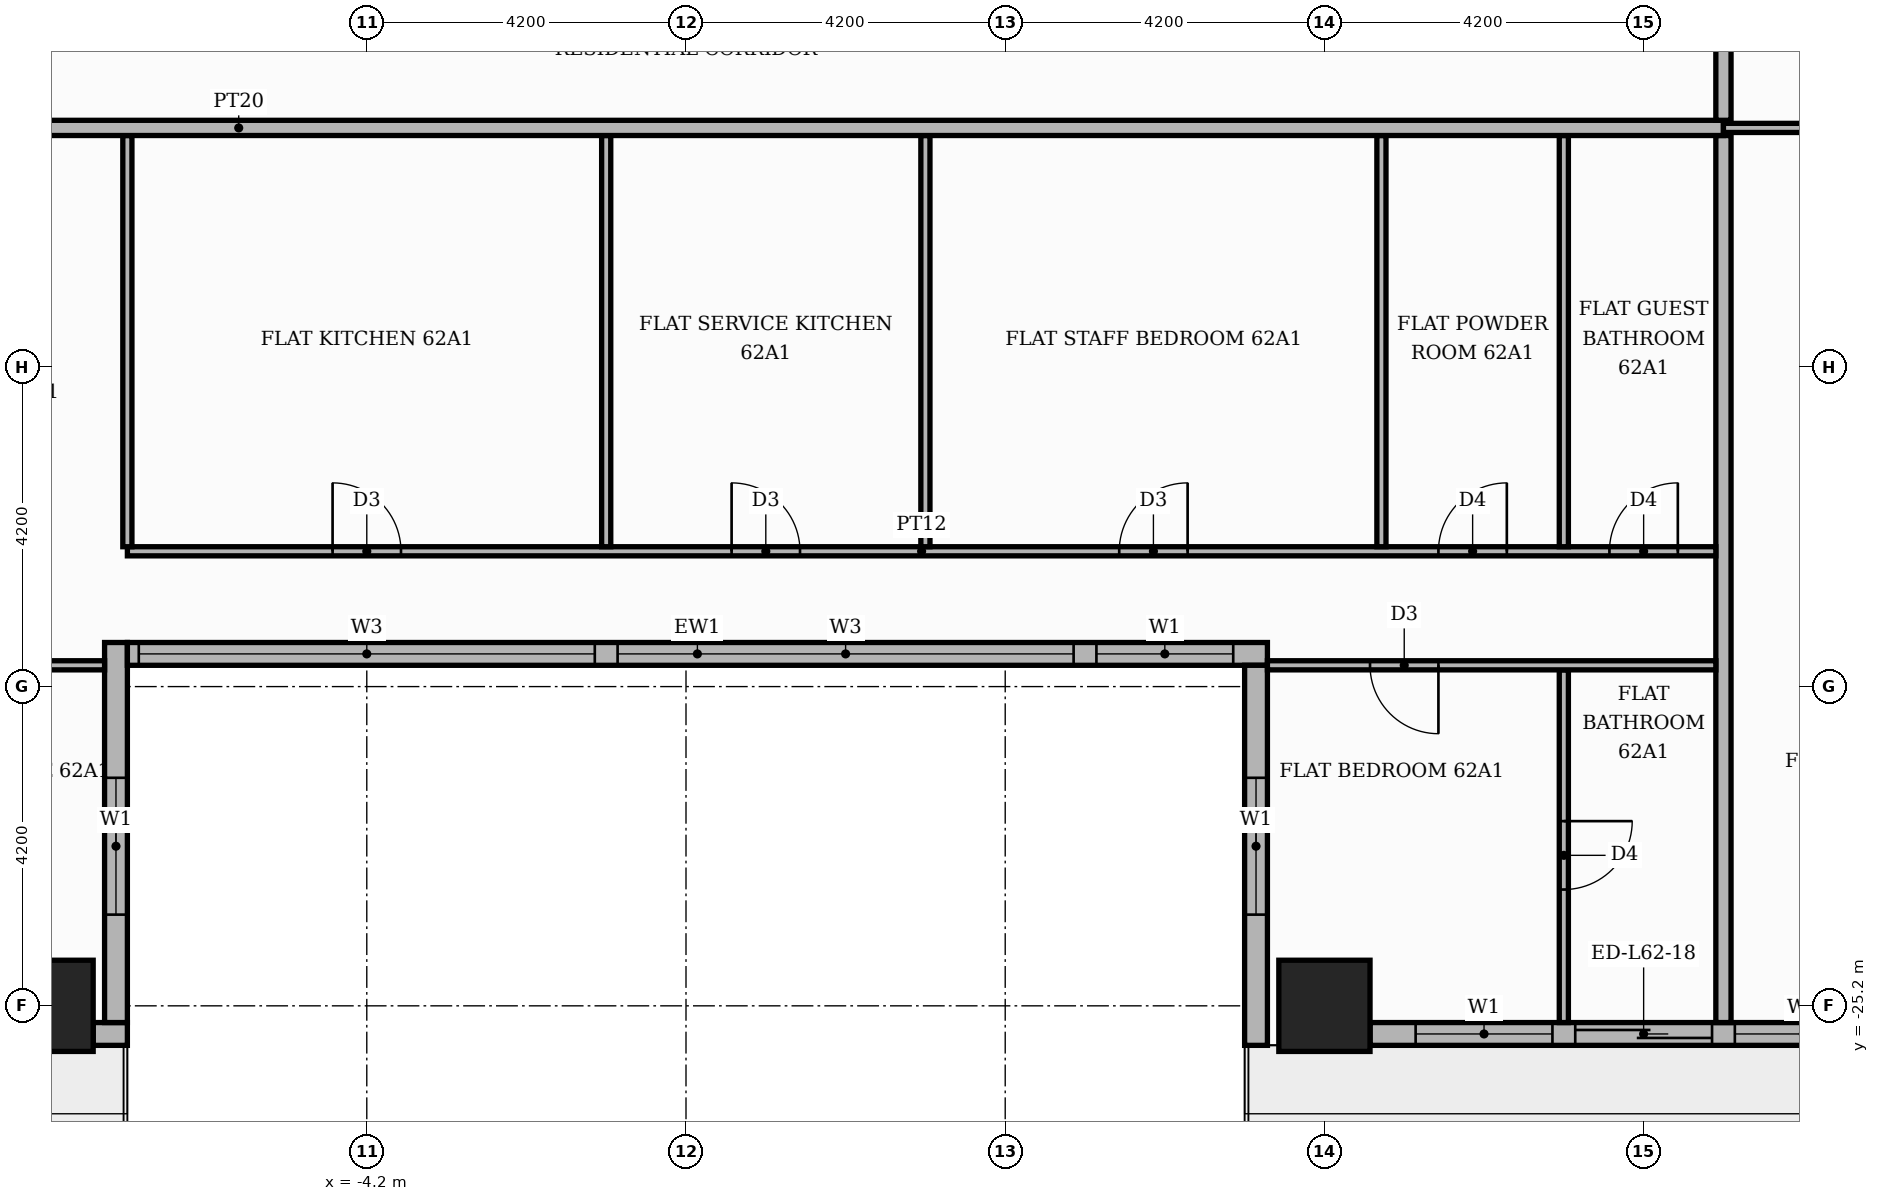
"""IFC4 building model, lengths in metres.
Left out: names, types, materials, properties, quantities, classifications, styles, units other than length and angle.
Written with IfcOpenShell. Run it as: python <this file> out.ifc"""

import sys

from ifc_helpers import new_model, si_unit, direction, frame, frame_2d, origin, origin_2d, place, context, subcontext, project, spatial, rectangle, extrude, element, fill, save


model = new_model("IFC4")
c1 = context("Model", 3, precision=1e-05, world=origin(), true_north=direction((0.0, 1.0)))
c2 = subcontext(c1, "Body", "Model", "MODEL_VIEW")
j1 = project(units=[si_unit("LENGTHUNIT", "METRE"), si_unit("PLANEANGLEUNIT", "RADIAN")], contexts=[c1])
p1 = place(None, origin())
s1 = spatial("IfcSite", under=j1, at=p1, CompositionType="ELEMENT")
p2 = place(p1, origin())
s2 = spatial("IfcBuilding", under=s1, at=p2, CompositionType="ELEMENT")
p3 = place(p2, frame((0.0, 0.0, 260.1)))
s3 = spatial("IfcBuildingStorey", under=s2, at=p3, CompositionType="ELEMENT", Elevation=260.1)
for number, where, z_axis, x_axis in (
    (1, (8.4, -25.2, 0.0), (0.0, 0.0, 1.0), (1.0, 0.0, 0.0)),
    (2, (-8.4, -25.2, 0.0), (0.0, 0.0, 1.0), (1.0, 0.0, 0.0)),
):
    element("IfcColumn", number, at=place(p3, frame(where, z_axis=z_axis, x_axis=x_axis)), inside=s3, PredefinedType="COLUMN", context=c2, shape_type="SweptSolid", body=[
        extrude(rectangle(XDim=1.2, YDim=1.2, at=origin_2d()), origin(), (0.0, 0.0, 1.0), 3.9),
    ])
p4 = place(p3, frame((-7.8, -25.57, 0.0), z_axis=(0.0, 0.0, 1.0), x_axis=(1.0, 0.0, 0.0)))
e3 = element("IfcWall", 3, at=p4, inside=s3, PredefinedType="STANDARD", context=c2, shape_type="SweptSolid", body=[
    extrude(rectangle(XDim=0.45, YDim=0.3, at=frame_2d((0.225, 0.0))), origin(), (0.0, 0.0, 1.0), 3.48),
])
p5 = place(p3, frame((-7.5, -25.42, 0.0), z_axis=(0.0, 0.0, 1.0), x_axis=(0.0, 1.0, 0.0)))
e4 = element("IfcWall", 4, at=p5, inside=s3, PredefinedType="STANDARD", context=c2, shape_type="SweptSolid", body=[
    extrude(rectangle(XDim=5.0, YDim=0.3, at=frame_2d((2.5, 0.0))), origin(), (0.0, 0.0, 1.0), 3.48),
])
p6 = place(p5, frame((1.42, 0.0, 0.9)))
e5 = element("IfcOpeningElement", 5, at=p6, cuts=e4, PredefinedType="OPENING", context=c2, shape_type="SweptSolid", body=[
    extrude(rectangle(XDim=1.8, YDim=2.1, at=frame_2d((0.9, 1.05))), frame((0.0, 0.16, 0.0), z_axis=(0.0, -1.0, 0.0), x_axis=(1.0, 0.0, 0.0)), (0.0, 0.0, 1.0), 0.32),
])
p7 = place(p3, frame((-7.35, -20.57, 0.0), z_axis=(0.0, 0.0, 1.0), x_axis=(1.0, 0.0, 0.0)))
e6 = element("IfcWall", 6, at=p7, inside=s3, PredefinedType="STANDARD", context=c2, shape_type="SweptSolid", body=[
    extrude(rectangle(XDim=15.0, YDim=0.3, at=frame_2d((7.5, 0.0))), origin(), (0.0, 0.0, 1.0), 3.48),
])
p8 = place(p7, frame((0.15, 0.0, 0.9)))
e7 = element("IfcOpeningElement", 7, at=p8, cuts=e6, PredefinedType="OPENING", context=c2, shape_type="SweptSolid", body=[
    extrude(rectangle(XDim=6.0, YDim=2.1, at=frame_2d((3.0, 1.05))), frame((0.0, 0.16, 0.0), z_axis=(0.0, -1.0, 0.0), x_axis=(1.0, 0.0, 0.0)), (0.0, 0.0, 1.0), 0.32),
])
p9 = place(p7, frame((6.45, 0.0, 0.9)))
e8 = element("IfcOpeningElement", 8, at=p9, cuts=e6, PredefinedType="OPENING", context=c2, shape_type="SweptSolid", body=[
    extrude(rectangle(XDim=6.0, YDim=2.1, at=frame_2d((3.0, 1.05))), frame((0.0, 0.16, 0.0), z_axis=(0.0, -1.0, 0.0), x_axis=(1.0, 0.0, 0.0)), (0.0, 0.0, 1.0), 0.32),
])
p10 = place(p7, frame((12.75, 0.0, 0.9)))
e9 = element("IfcOpeningElement", 9, at=p10, cuts=e6, PredefinedType="OPENING", context=c2, shape_type="SweptSolid", body=[
    extrude(rectangle(XDim=1.8, YDim=2.1, at=frame_2d((0.9, 1.05))), frame((0.0, 0.16, 0.0), z_axis=(0.0, -1.0, 0.0), x_axis=(1.0, 0.0, 0.0)), (0.0, 0.0, 1.0), 0.32),
])
p11 = place(p3, frame((7.5, -20.72, 0.0), z_axis=(0.0, 0.0, 1.0), x_axis=(0.0, -1.0, 0.0)))
e10 = element("IfcWall", 10, at=p11, inside=s3, PredefinedType="STANDARD", context=c2, shape_type="SweptSolid", body=[
    extrude(rectangle(XDim=5.0, YDim=0.3, at=frame_2d((2.5, 0.0))), origin(), (0.0, 0.0, 1.0), 3.48),
])
p12 = place(p11, frame((1.48, 0.0, 0.9)))
e11 = element("IfcOpeningElement", 11, at=p12, cuts=e10, PredefinedType="OPENING", context=c2, shape_type="SweptSolid", body=[
    extrude(rectangle(XDim=1.8, YDim=2.1, at=frame_2d((0.9, 1.05))), frame((0.0, 0.16, 0.0), z_axis=(0.0, -1.0, 0.0), x_axis=(1.0, 0.0, 0.0)), (0.0, 0.0, 1.0), 0.32),
])
p13 = place(p3, frame((9.0, -25.57, 0.0), z_axis=(0.0, 0.0, 1.0), x_axis=(1.0, 0.0, 0.0)))
e12 = element("IfcWall", 12, at=p13, inside=s3, PredefinedType="STANDARD", context=c2, shape_type="SweptSolid", body=[
    extrude(rectangle(XDim=7.2, YDim=0.3, at=frame_2d((3.6, 0.0))), origin(), (0.0, 0.0, 1.0), 3.48),
])
p14 = place(p13, frame((0.6, 0.0, 0.9)))
e13 = element("IfcOpeningElement", 13, at=p14, cuts=e12, PredefinedType="OPENING", context=c2, shape_type="SweptSolid", body=[
    extrude(rectangle(XDim=1.8, YDim=2.1, at=frame_2d((0.9, 1.05))), frame((0.0, 0.16, 0.0), z_axis=(0.0, -1.0, 0.0), x_axis=(1.0, 0.0, 0.0)), (0.0, 0.0, 1.0), 0.32),
])
p15 = place(p13, frame((2.7, 0.0, 0.0)))
e14 = element("IfcOpeningElement", 14, at=p15, cuts=e12, PredefinedType="OPENING", context=c2, shape_type="SweptSolid", body=[
    extrude(rectangle(XDim=1.8, YDim=2.4, at=frame_2d((0.9, 1.2))), frame((0.0, 0.16, 0.0), z_axis=(0.0, -1.0, 0.0), x_axis=(1.0, 0.0, 0.0)), (0.0, 0.0, 1.0), 0.32),
])
p16 = place(p13, frame((4.8, 0.0, 0.9)))
e15 = element("IfcOpeningElement", 15, at=p16, cuts=e12, PredefinedType="OPENING", context=c2, shape_type="SweptSolid", body=[
    extrude(rectangle(XDim=1.8, YDim=2.1, at=frame_2d((0.9, 1.05))), frame((0.0, 0.16, 0.0), z_axis=(0.0, -1.0, 0.0), x_axis=(1.0, 0.0, 0.0)), (0.0, 0.0, 1.0), 0.32),
])
p17 = place(p3, frame((11.55, -25.42, 0.0), z_axis=(0.0, 0.0, 1.0), x_axis=(0.0, 1.0, 0.0)))
e16 = element("IfcWall", 16, at=p17, inside=s3, PredefinedType="PARTITIONING", context=c2, shape_type="SweptSolid", body=[
    extrude(rectangle(XDim=4.64, YDim=0.12, at=frame_2d((2.32, 0.0))), origin(), (0.0, 0.0, 1.0), 3.48),
])
p18 = place(p17, frame((1.75, 0.0, 0.0)))
e17 = element("IfcOpeningElement", 17, at=p18, cuts=e16, PredefinedType="OPENING", context=c2, shape_type="SweptSolid", body=[
    extrude(rectangle(XDim=0.9, YDim=2.1, at=frame_2d((0.45, 1.05))), frame((0.0, 0.07, 0.0), z_axis=(0.0, -1.0, 0.0), x_axis=(1.0, 0.0, 0.0)), (0.0, 0.0, 1.0), 0.14),
])
p19 = place(p3, frame((13.65, -25.42, 0.0), z_axis=(0.0, 0.0, 1.0), x_axis=(0.0, 1.0, 0.0)))
e18 = element("IfcWall", 18, at=p19, inside=s3, PredefinedType="PARTITIONING", context=c2, shape_type="SweptSolid", body=[
    extrude(rectangle(XDim=11.67, YDim=0.2, at=frame_2d((5.835, 0.0))), origin(), (0.0, 0.0, 1.0), 3.48),
])
p20 = place(p3, frame((-20.42, -20.72, 0.0), z_axis=(0.0, 0.0, 1.0), x_axis=(1.0, 0.0, 0.0)))
e19 = element("IfcWall", 19, at=p20, inside=s3, PredefinedType="PARTITIONING", context=c2, shape_type="SweptSolid", body=[
    extrude(rectangle(XDim=12.77, YDim=0.12, at=frame_2d((6.385, 0.0))), origin(), (0.0, 0.0, 1.0), 3.48),
])
p21 = place(p20, frame((7.32, 0.0, 0.0)))
e20 = element("IfcOpeningElement", 20, at=p21, cuts=e19, PredefinedType="OPENING", context=c2, shape_type="SweptSolid", body=[
    extrude(rectangle(XDim=1.0, YDim=2.1, at=frame_2d((0.5, 1.05))), frame((0.0, 0.07, 0.0), z_axis=(0.0, -1.0, 0.0), x_axis=(1.0, 0.0, 0.0)), (0.0, 0.0, 1.0), 0.14),
])
p22 = place(p20, frame((10.47, 0.0, 0.0)))
e21 = element("IfcOpeningElement", 21, at=p22, cuts=e19, PredefinedType="OPENING", context=c2, shape_type="SweptSolid", body=[
    extrude(rectangle(XDim=1.0, YDim=2.1, at=frame_2d((0.5, 1.05))), frame((0.0, 0.07, 0.0), z_axis=(0.0, -1.0, 0.0), x_axis=(1.0, 0.0, 0.0)), (0.0, 0.0, 1.0), 0.14),
])
p23 = place(p3, frame((7.65, -20.72, 0.0), z_axis=(0.0, 0.0, 1.0), x_axis=(1.0, 0.0, 0.0)))
e22 = element("IfcWall", 22, at=p23, inside=s3, PredefinedType="PARTITIONING", context=c2, shape_type="SweptSolid", body=[
    extrude(rectangle(XDim=5.9, YDim=0.12, at=frame_2d((2.95, 0.0))), origin(), (0.0, 0.0, 1.0), 3.48),
])
p24 = place(p23, frame((1.35, 0.0, 0.0)))
e23 = element("IfcOpeningElement", 23, at=p24, cuts=e22, PredefinedType="OPENING", context=c2, shape_type="SweptSolid", body=[
    extrude(rectangle(XDim=0.9, YDim=2.1, at=frame_2d((0.45, 1.05))), frame((0.0, 0.07, 0.0), z_axis=(0.0, -1.0, 0.0), x_axis=(1.0, 0.0, 0.0)), (0.0, 0.0, 1.0), 0.14),
])
p25 = place(p3, frame((-7.35, -19.22, 0.0), z_axis=(0.0, 0.0, 1.0), x_axis=(1.0, 0.0, 0.0)))
e24 = element("IfcWall", 24, at=p25, inside=s3, PredefinedType="PARTITIONING", context=c2, shape_type="SweptSolid", body=[
    extrude(rectangle(XDim=20.9, YDim=0.12, at=frame_2d((10.45, 0.0))), origin(), (0.0, 0.0, 1.0), 3.48),
])
p26 = place(p25, frame((2.7, 0.0, 0.0)))
e25 = element("IfcOpeningElement", 25, at=p26, cuts=e24, PredefinedType="OPENING", context=c2, shape_type="SweptSolid", body=[
    extrude(rectangle(XDim=0.9, YDim=2.1, at=frame_2d((0.45, 1.05))), frame((0.0, 0.07, 0.0), z_axis=(0.0, -1.0, 0.0), x_axis=(1.0, 0.0, 0.0)), (0.0, 0.0, 1.0), 0.14),
])
p27 = place(p25, frame((7.95, 0.0, 0.0)))
e26 = element("IfcOpeningElement", 26, at=p27, cuts=e24, PredefinedType="OPENING", context=c2, shape_type="SweptSolid", body=[
    extrude(rectangle(XDim=0.9, YDim=2.1, at=frame_2d((0.45, 1.05))), frame((0.0, 0.07, 0.0), z_axis=(0.0, -1.0, 0.0), x_axis=(1.0, 0.0, 0.0)), (0.0, 0.0, 1.0), 0.14),
])
p28 = place(p25, frame((13.05, 0.0, 0.0)))
e27 = element("IfcOpeningElement", 27, at=p28, cuts=e24, PredefinedType="OPENING", context=c2, shape_type="SweptSolid", body=[
    extrude(rectangle(XDim=0.9, YDim=2.1, at=frame_2d((0.45, 1.05))), frame((0.0, 0.07, 0.0), z_axis=(0.0, -1.0, 0.0), x_axis=(1.0, 0.0, 0.0)), (0.0, 0.0, 1.0), 0.14),
])
p29 = place(p25, frame((17.25, 0.0, 0.0)))
e28 = element("IfcOpeningElement", 28, at=p29, cuts=e24, PredefinedType="OPENING", context=c2, shape_type="SweptSolid", body=[
    extrude(rectangle(XDim=0.9, YDim=2.1, at=frame_2d((0.45, 1.05))), frame((0.0, 0.07, 0.0), z_axis=(0.0, -1.0, 0.0), x_axis=(1.0, 0.0, 0.0)), (0.0, 0.0, 1.0), 0.14),
])
p30 = place(p25, frame((19.5, 0.0, 0.0)))
e29 = element("IfcOpeningElement", 29, at=p30, cuts=e24, PredefinedType="OPENING", context=c2, shape_type="SweptSolid", body=[
    extrude(rectangle(XDim=0.9, YDim=2.1, at=frame_2d((0.45, 1.05))), frame((0.0, 0.07, 0.0), z_axis=(0.0, -1.0, 0.0), x_axis=(1.0, 0.0, 0.0)), (0.0, 0.0, 1.0), 0.14),
])
for number, where, z_axis, x_axis in (
    (30, (-7.35, -19.16, 0.0), (0.0, 0.0, 1.0), (0.0, 1.0, 0.0)),
    (31, (-1.05, -19.16, 0.0), (0.0, 0.0, 1.0), (0.0, 1.0, 0.0)),
    (32, (3.15, -19.16, 0.0), (0.0, 0.0, 1.0), (0.0, 1.0, 0.0)),
    (33, (9.15, -19.16, 0.0), (0.0, 0.0, 1.0), (0.0, 1.0, 0.0)),
    (34, (11.55, -19.16, 0.0), (0.0, 0.0, 1.0), (0.0, 1.0, 0.0)),
):
    element("IfcWall", number, at=place(p3, frame(where, z_axis=z_axis, x_axis=x_axis)), inside=s3, PredefinedType="PARTITIONING", context=c2, shape_type="SweptSolid", body=[
        extrude(rectangle(XDim=5.41, YDim=0.12, at=frame_2d((2.705, 0.0))), origin(), (0.0, 0.0, 1.0), 3.48),
    ])
p31 = place(p3, frame((-25.42, -13.65, 0.0), z_axis=(0.0, 0.0, 1.0), x_axis=(1.0, 0.0, 0.0)))
e35 = element("IfcWall", 35, at=p31, inside=s3, PredefinedType="PARTITIONING", context=c2, shape_type="SweptSolid", body=[
    extrude(rectangle(XDim=39.07, YDim=0.2, at=frame_2d((19.535, 0.0))), origin(), (0.0, 0.0, 1.0), 3.48),
])
p32 = place(p31, frame((14.37, 0.0, 0.0)))
e36 = element("IfcOpeningElement", 36, at=p32, cuts=e35, PredefinedType="OPENING", context=c2, shape_type="SweptSolid", body=[
    extrude(rectangle(XDim=1.1, YDim=2.4, at=frame_2d((0.55, 1.2))), frame((0.0, 0.11, 0.0), z_axis=(0.0, -1.0, 0.0), x_axis=(1.0, 0.0, 0.0)), (0.0, 0.0, 1.0), 0.22),
])
p33 = place(p3, frame((13.65, -13.65, 0.0), z_axis=(0.0, 0.0, 1.0), x_axis=(1.0, 0.0, 0.0)))
e37 = element("IfcWall", 37, at=p33, inside=s3, PredefinedType="PARTITIONING", context=c2, shape_type="SweptSolid", body=[
    extrude(rectangle(XDim=6.47, YDim=0.12, at=frame_2d((3.235, 0.0))), origin(), (0.0, 0.0, 1.0), 3.48),
])
p34 = place(p33, frame((2.785, 0.0, 0.0)))
e38 = element("IfcOpeningElement", 38, at=p34, cuts=e37, PredefinedType="OPENING", context=c2, shape_type="SweptSolid", body=[
    extrude(rectangle(XDim=0.9, YDim=2.1, at=frame_2d((0.45, 1.05))), frame((0.0, 0.07, 0.0), z_axis=(0.0, -1.0, 0.0), x_axis=(1.0, 0.0, 0.0)), (0.0, 0.0, 1.0), 0.14),
])
p35 = place(p3, frame((13.65, -13.55, 0.0), z_axis=(0.0, 0.0, 1.0), x_axis=(0.0, 1.0, 0.0)))
e39 = element("IfcWall", 39, at=p35, inside=s3, PredefinedType="PARTITIONING", context=c2, shape_type="SweptSolid", body=[
    extrude(rectangle(XDim=2.45, YDim=0.2, at=frame_2d((1.225, 0.0))), origin(), (0.0, 0.0, 1.0), 3.48),
])
p36 = place(p6, origin())
e40 = element("IfcWindow", 40, at=p36, inside=s3, PartitioningType="SINGLE_PANEL", PredefinedType="WINDOW", context=c2, shape_type="SweptSolid", body=[
    extrude(rectangle(XDim=1.8, YDim=2.1, at=frame_2d((0.9, 1.05))), frame((0.0, 0.03, 0.0), z_axis=(0.0, -1.0, 0.0), x_axis=(1.0, 0.0, 0.0)), (0.0, 0.0, 1.0), 0.06),
])
fill(e5, e40)
p37 = place(p8, origin())
e41 = element("IfcWindow", 41, at=p37, inside=s3, PartitioningType="SINGLE_PANEL", PredefinedType="WINDOW", context=c2, shape_type="SweptSolid", body=[
    extrude(rectangle(XDim=6.0, YDim=2.1, at=frame_2d((3.0, 1.05))), frame((0.0, 0.03, 0.0), z_axis=(0.0, -1.0, 0.0), x_axis=(1.0, 0.0, 0.0)), (0.0, 0.0, 1.0), 0.06),
])
fill(e7, e41)
p38 = place(p9, origin())
e42 = element("IfcWindow", 42, at=p38, inside=s3, PartitioningType="SINGLE_PANEL", PredefinedType="WINDOW", context=c2, shape_type="SweptSolid", body=[
    extrude(rectangle(XDim=6.0, YDim=2.1, at=frame_2d((3.0, 1.05))), frame((0.0, 0.03, 0.0), z_axis=(0.0, -1.0, 0.0), x_axis=(1.0, 0.0, 0.0)), (0.0, 0.0, 1.0), 0.06),
])
fill(e8, e42)
p39 = place(p10, origin())
e43 = element("IfcWindow", 43, at=p39, inside=s3, PartitioningType="SINGLE_PANEL", PredefinedType="WINDOW", context=c2, shape_type="SweptSolid", body=[
    extrude(rectangle(XDim=1.8, YDim=2.1, at=frame_2d((0.9, 1.05))), frame((0.0, 0.03, 0.0), z_axis=(0.0, -1.0, 0.0), x_axis=(1.0, 0.0, 0.0)), (0.0, 0.0, 1.0), 0.06),
])
fill(e9, e43)
p40 = place(p12, origin())
e44 = element("IfcWindow", 44, at=p40, inside=s3, PartitioningType="SINGLE_PANEL", PredefinedType="WINDOW", context=c2, shape_type="SweptSolid", body=[
    extrude(rectangle(XDim=1.8, YDim=2.1, at=frame_2d((0.9, 1.05))), frame((0.0, 0.03, 0.0), z_axis=(0.0, -1.0, 0.0), x_axis=(1.0, 0.0, 0.0)), (0.0, 0.0, 1.0), 0.06),
])
fill(e11, e44)
p41 = place(p14, origin())
e45 = element("IfcWindow", 45, at=p41, inside=s3, PartitioningType="SINGLE_PANEL", PredefinedType="WINDOW", context=c2, shape_type="SweptSolid", body=[
    extrude(rectangle(XDim=1.8, YDim=2.1, at=frame_2d((0.9, 1.05))), frame((0.0, 0.03, 0.0), z_axis=(0.0, -1.0, 0.0), x_axis=(1.0, 0.0, 0.0)), (0.0, 0.0, 1.0), 0.06),
])
fill(e13, e45)
p42 = place(p15, origin())
e46 = element("IfcDoor", 46, at=p42, inside=s3, OperationType="SLIDING_TO_RIGHT", PredefinedType="DOOR", context=c2, shape_type="SweptSolid", body=[
    extrude(rectangle(XDim=1.8, YDim=2.4, at=frame_2d((0.9, 1.2))), frame((0.0, 0.025, 0.0), z_axis=(0.0, -1.0, 0.0), x_axis=(1.0, 0.0, 0.0)), (0.0, 0.0, 1.0), 0.05),
])
fill(e14, e46)
p43 = place(p16, origin())
e47 = element("IfcWindow", 47, at=p43, inside=s3, PartitioningType="SINGLE_PANEL", PredefinedType="WINDOW", context=c2, shape_type="SweptSolid", body=[
    extrude(rectangle(XDim=1.8, YDim=2.1, at=frame_2d((0.9, 1.05))), frame((0.0, 0.03, 0.0), z_axis=(0.0, -1.0, 0.0), x_axis=(1.0, 0.0, 0.0)), (0.0, 0.0, 1.0), 0.06),
])
fill(e15, e47)
p44 = place(p26, origin())
e48 = element("IfcDoor", 48, at=p44, inside=s3, OperationType="SINGLE_SWING_LEFT", PredefinedType="DOOR", context=c2, shape_type="SweptSolid", body=[
    extrude(rectangle(XDim=0.9, YDim=2.1, at=frame_2d((0.45, 1.05))), frame((0.0, 0.025, 0.0), z_axis=(0.0, -1.0, 0.0), x_axis=(1.0, 0.0, 0.0)), (0.0, 0.0, 1.0), 0.05),
])
fill(e25, e48)
p45 = place(p27, origin())
e49 = element("IfcDoor", 49, at=p45, inside=s3, OperationType="SINGLE_SWING_LEFT", PredefinedType="DOOR", context=c2, shape_type="SweptSolid", body=[
    extrude(rectangle(XDim=0.9, YDim=2.1, at=frame_2d((0.45, 1.05))), frame((0.0, 0.025, 0.0), z_axis=(0.0, -1.0, 0.0), x_axis=(1.0, 0.0, 0.0)), (0.0, 0.0, 1.0), 0.05),
])
fill(e26, e49)
p46 = place(p28, origin())
e50 = element("IfcDoor", 50, at=p46, inside=s3, OperationType="SINGLE_SWING_RIGHT", PredefinedType="DOOR", context=c2, shape_type="SweptSolid", body=[
    extrude(rectangle(XDim=0.9, YDim=2.1, at=frame_2d((0.45, 1.05))), frame((0.0, 0.025, 0.0), z_axis=(0.0, -1.0, 0.0), x_axis=(1.0, 0.0, 0.0)), (0.0, 0.0, 1.0), 0.05),
])
fill(e27, e50)
p47 = place(p29, origin())
e51 = element("IfcDoor", 51, at=p47, inside=s3, OperationType="SINGLE_SWING_RIGHT", PredefinedType="DOOR", context=c2, shape_type="SweptSolid", body=[
    extrude(rectangle(XDim=0.9, YDim=2.1, at=frame_2d((0.45, 1.05))), frame((0.0, 0.025, 0.0), z_axis=(0.0, -1.0, 0.0), x_axis=(1.0, 0.0, 0.0)), (0.0, 0.0, 1.0), 0.05),
])
fill(e28, e51)
p48 = place(p30, origin())
e52 = element("IfcDoor", 52, at=p48, inside=s3, OperationType="SINGLE_SWING_RIGHT", PredefinedType="DOOR", context=c2, shape_type="SweptSolid", body=[
    extrude(rectangle(XDim=0.9, YDim=2.1, at=frame_2d((0.45, 1.05))), frame((0.0, 0.025, 0.0), z_axis=(0.0, -1.0, 0.0), x_axis=(1.0, 0.0, 0.0)), (0.0, 0.0, 1.0), 0.05),
])
fill(e29, e52)
p49 = place(p24, frame((0.9, 0.0, 0.0), z_axis=(0.0, 0.0, 1.0), x_axis=(-1.0, 0.0, 0.0)))
e53 = element("IfcDoor", 53, at=p49, inside=s3, OperationType="SINGLE_SWING_RIGHT", PredefinedType="DOOR", context=c2, shape_type="SweptSolid", body=[
    extrude(rectangle(XDim=0.9, YDim=2.1, at=frame_2d((0.45, 1.05))), frame((0.0, 0.025, 0.0), z_axis=(0.0, -1.0, 0.0), x_axis=(1.0, 0.0, 0.0)), (0.0, 0.0, 1.0), 0.05),
])
fill(e23, e53)
p50 = place(p18, frame((0.9, 0.0, 0.0), z_axis=(0.0, 0.0, 1.0), x_axis=(-1.0, 0.0, 0.0)))
e54 = element("IfcDoor", 54, at=p50, inside=s3, OperationType="SINGLE_SWING_RIGHT", PredefinedType="DOOR", context=c2, shape_type="SweptSolid", body=[
    extrude(rectangle(XDim=0.9, YDim=2.1, at=frame_2d((0.45, 1.05))), frame((0.0, 0.025, 0.0), z_axis=(0.0, -1.0, 0.0), x_axis=(1.0, 0.0, 0.0)), (0.0, 0.0, 1.0), 0.05),
])
fill(e17, e54)
save(model, sys.argv[1])
